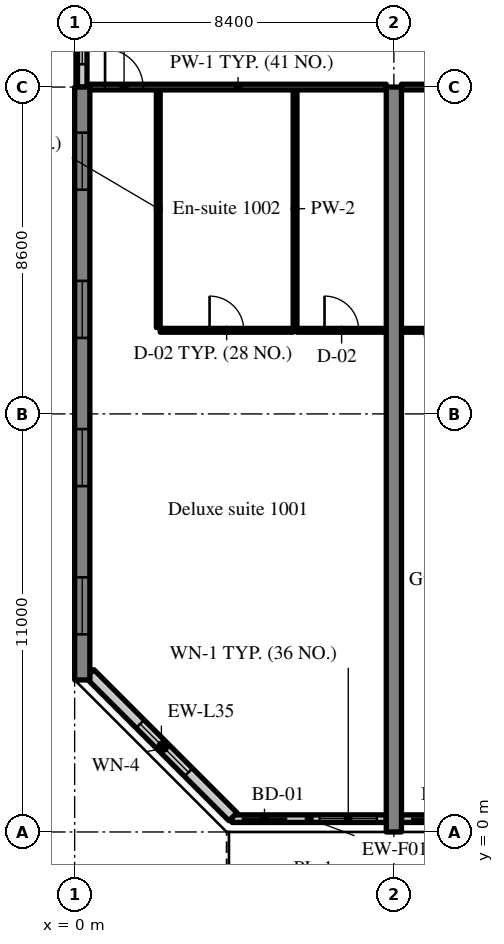
"""IFC4 building model, lengths in metres.
Left out: names, types, materials, properties, quantities, classifications, styles, units other than length and angle.
Written with IfcOpenShell. Run it as: python <this file> out.ifc"""

import sys

from ifc_helpers import new_model, si_unit, direction, frame, frame_2d, origin, place, context, subcontext, project, spatial, rectangle, extrude, source, transform, mapped, element, fill, save


model = new_model("IFC4")
c1 = context("Model", 3, precision=1e-05, world=origin(), true_north=direction((0.0, 1.0)))
c2 = subcontext(c1, "Body", "Model", "MODEL_VIEW")
j1 = project(units=[si_unit("LENGTHUNIT", "METRE"), si_unit("PLANEANGLEUNIT", "RADIAN")], contexts=[c1])
p1 = place(None, origin())
s1 = spatial("IfcSite", under=j1, at=p1, CompositionType="ELEMENT")
p2 = place(p1, origin())
s2 = spatial("IfcBuilding", under=s1, at=p2, CompositionType="ELEMENT")
p3 = place(p2, frame((0.0, 0.0, 46.8)))
s3 = spatial("IfcBuildingStorey", under=s2, at=p3, CompositionType="ELEMENT", Elevation=46.8)
m1 = source(origin(), c2, "Body", "SweptSolid", [
    extrude(rectangle(XDim=15.6, YDim=0.4, at=frame_2d((7.8, 0.0))), origin(), (0.0, 0.0, 1.0), 3.52),
])
p4 = place(p3, frame((0.2, 4.0, 0.0), z_axis=(0.0, 0.0, 1.0), x_axis=(0.0, 1.0, 0.0)))
e1 = element("IfcWall", 1, at=p4, inside=s3, PredefinedType="SHEAR", context=c2, shape_type="MappedRepresentation", body=[
    mapped(m1, transform((0.0, 0.0, 0.0), scale=1.0)),
])
m2 = source(origin(), c2, "Body", "SweptSolid", [
    extrude(rectangle(XDim=1.5, YDim=1.5, at=frame_2d((0.75, 0.75))), frame((0.0, 0.21, 0.0), z_axis=(0.0, -1.0, 0.0), x_axis=(1.0, 0.0, 0.0)), (0.0, 0.0, 1.0), 0.42),
])
p5 = place(p4, frame((1.2, 0.0, 0.9)))
e2 = element("IfcOpeningElement", 2, at=p5, cuts=e1, PredefinedType="OPENING", context=c2, shape_type="MappedRepresentation", body=[
    mapped(m2, transform((0.0, 0.0, 0.0), scale=1.0)),
])
p6 = place(p4, frame((5.1, 0.0, 0.9)))
e3 = element("IfcOpeningElement", 3, at=p6, cuts=e1, PredefinedType="OPENING", context=c2, shape_type="MappedRepresentation", body=[
    mapped(m2, transform((0.0, 0.0, 0.0), scale=1.0)),
])
p7 = place(p4, frame((9.0, 0.0, 0.9)))
e4 = element("IfcOpeningElement", 4, at=p7, cuts=e1, PredefinedType="OPENING", context=c2, shape_type="MappedRepresentation", body=[
    mapped(m2, transform((0.0, 0.0, 0.0), scale=1.0)),
])
p8 = place(p4, frame((12.9, 0.0, 0.9)))
e5 = element("IfcOpeningElement", 5, at=p8, cuts=e1, PredefinedType="OPENING", context=c2, shape_type="MappedRepresentation", body=[
    mapped(m2, transform((0.0, 0.0, 0.0), scale=1.0)),
])
m3 = source(origin(), c2, "Body", "SweptSolid", [
    extrude(rectangle(XDim=19.6, YDim=0.4, at=frame_2d((9.8, 0.0))), origin(), (0.0, 0.0, 1.0), 3.52),
])
p9 = place(p3, frame((8.4, 0.0, 0.0), z_axis=(0.0, 0.0, 1.0), x_axis=(0.0, 1.0, 0.0)))
e6 = element("IfcWall", 6, at=p9, inside=s3, PredefinedType="SHEAR", context=c2, shape_type="MappedRepresentation", body=[
    mapped(m3, transform((0.0, 0.0, 0.0), scale=1.0)),
])
m4 = source(origin(), c2, "Body", "SweptSolid", [
    extrude(rectangle(XDim=4.055, YDim=0.2, at=frame_2d((2.027, 0.0))), origin(), (0.0, 0.0, 1.0), 2.82),
])
p10 = place(p3, frame((4.145, 0.35, 0.0), z_axis=(0.0, 0.0, 1.0), x_axis=(1.0, 0.0, 0.0)))
e7 = element("IfcWall", 7, at=p10, inside=s3, PredefinedType="SOLIDWALL", context=c2, shape_type="MappedRepresentation", body=[
    mapped(m4, transform((0.0, 0.0, 0.0), scale=1.0)),
])
m5 = source(origin(), c2, "Body", "SweptSolid", [
    extrude(rectangle(XDim=1.2, YDim=2.4, at=frame_2d((0.6, 1.2))), frame((0.0, 0.11, 0.0), z_axis=(0.0, -1.0, 0.0), x_axis=(1.0, 0.0, 0.0)), (0.0, 0.0, 1.0), 0.22),
])
p11 = place(p10, frame((0.25, 0.0, 0.0)))
e8 = element("IfcOpeningElement", 8, at=p11, cuts=e7, PredefinedType="OPENING", context=c2, shape_type="MappedRepresentation", body=[
    mapped(m5, transform((0.0, 0.0, 0.0), scale=1.0)),
])
m6 = source(origin(), c2, "Body", "SweptSolid", [
    extrude(rectangle(XDim=1.5, YDim=1.5, at=frame_2d((0.75, 0.75))), frame((0.0, 0.11, 0.0), z_axis=(0.0, -1.0, 0.0), x_axis=(1.0, 0.0, 0.0)), (0.0, 0.0, 1.0), 0.22),
])
p12 = place(p10, frame((2.305, 0.0, 0.9)))
e9 = element("IfcOpeningElement", 9, at=p12, cuts=e7, PredefinedType="OPENING", context=c2, shape_type="MappedRepresentation", body=[
    mapped(m6, transform((0.0, 0.0, 0.0), scale=1.0)),
])
m7 = source(origin(), c2, "Body", "SweptSolid", [
    extrude(rectangle(XDim=3.6, YDim=0.2, at=frame_2d((1.8, 0.0))), origin(), (0.0, 0.0, 1.0), 2.82),
])
p13 = place(p3, frame((8.6, 0.35, 0.0), z_axis=(0.0, 0.0, 1.0), x_axis=(1.0, 0.0, 0.0)))
e10 = element("IfcWall", 10, at=p13, inside=s3, PredefinedType="SOLIDWALL", context=c2, shape_type="MappedRepresentation", body=[
    mapped(m7, transform((0.0, 0.0, 0.0), scale=1.0)),
])
p14 = place(p13, frame((0.25, 0.0, 0.0)))
e11 = element("IfcOpeningElement", 11, at=p14, cuts=e10, PredefinedType="OPENING", context=c2, shape_type="MappedRepresentation", body=[
    mapped(m5, transform((0.0, 0.0, 0.0), scale=1.0)),
])
p15 = place(p13, frame((1.85, 0.0, 0.9)))
e12 = element("IfcOpeningElement", 12, at=p15, cuts=e10, PredefinedType="OPENING", context=c2, shape_type="MappedRepresentation", body=[
    mapped(m6, transform((0.0, 0.0, 0.0), scale=1.0)),
])
m8 = source(origin(), c2, "Body", "SweptSolid", [
    extrude(rectangle(XDim=5.326, YDim=0.3, at=frame_2d((2.663, 0.0))), origin(), (0.0, 0.0, 1.0), 3.52),
])
p16 = place(p3, frame((0.4, 4.166, 0.0), z_axis=(0.0, 0.0, 1.0), x_axis=(0.707106781187, -0.707106781187, 0.0)))
e13 = element("IfcWall", 13, at=p16, inside=s3, PredefinedType="SOLIDWALL", context=c2, shape_type="MappedRepresentation", body=[
    mapped(m8, transform((0.0, 0.0, 0.0), scale=1.0)),
])
m9 = source(origin(), c2, "Body", "SweptSolid", [
    extrude(rectangle(XDim=1.8, YDim=1.5, at=frame_2d((0.9, 0.75))), frame((0.0, 0.16, 0.0), z_axis=(0.0, -1.0, 0.0), x_axis=(1.0, 0.0, 0.0)), (0.0, 0.0, 1.0), 0.32),
])
p17 = place(p16, frame((1.871, 0.0, 0.9)))
e14 = element("IfcOpeningElement", 14, at=p17, cuts=e13, PredefinedType="OPENING", context=c2, shape_type="MappedRepresentation", body=[
    mapped(m9, transform((0.0, 0.0, 0.0), scale=1.0)),
])
m10 = source(origin(), c2, "Body", "SweptSolid", [
    extrude(rectangle(XDim=2.4, YDim=0.25, at=frame_2d((1.2, 0.0))), origin(), (0.0, 0.0, 1.0), 2.62),
])
p18 = place(p3, frame((0.2, 19.6, 0.0), z_axis=(0.0, 0.0, 1.0), x_axis=(0.0, 1.0, 0.0)))
e15 = element("IfcWall", 15, at=p18, inside=s3, PredefinedType="SOLIDWALL", context=c2, shape_type="MappedRepresentation", body=[
    mapped(m10, transform((0.0, 0.0, 0.0), scale=1.0)),
])
m11 = source(origin(), c2, "Body", "SweptSolid", [
    extrude(rectangle(XDim=1.2, YDim=1.5, at=frame_2d((0.6, 0.75))), frame((0.0, 0.135, 0.0), z_axis=(0.0, -1.0, 0.0), x_axis=(1.0, 0.0, 0.0)), (0.0, 0.0, 1.0), 0.27),
])
p19 = place(p18, frame((0.6, 0.0, 0.9)))
e16 = element("IfcOpeningElement", 16, at=p19, cuts=e15, PredefinedType="OPENING", context=c2, shape_type="MappedRepresentation", body=[
    mapped(m11, transform((0.0, 0.0, 0.0), scale=1.0)),
])
m12 = source(origin(), c2, "Body", "SweptSolid", [
    extrude(rectangle(XDim=6.25, YDim=0.1, at=frame_2d((3.125, 0.0))), origin(), (0.0, 0.0, 1.0), 3.52),
])
for number, where, z_axis, x_axis in (
    (17, (2.2, 13.275, 0.0), (0.0, 0.0, 1.0), (0.0, 1.0, 0.0)),
    (18, (5.8, 13.275, 0.0), (0.0, 0.0, 1.0), (0.0, 1.0, 0.0)),
):
    element("IfcWall", number, at=place(p3, frame(where, z_axis=z_axis, x_axis=x_axis)), inside=s3, PredefinedType="PARTITIONING", context=c2, shape_type="MappedRepresentation", body=[
        mapped(m12, transform((0.0, 0.0, 0.0), scale=1.0)),
    ])
m13 = source(origin(), c2, "Body", "SweptSolid", [
    extrude(rectangle(XDim=3.5, YDim=0.1, at=frame_2d((1.75, 0.0))), origin(), (0.0, 0.0, 1.0), 3.52),
])
p20 = place(p3, frame((2.25, 13.2, 0.0), z_axis=(0.0, 0.0, 1.0), x_axis=(1.0, 0.0, 0.0)))
e19 = element("IfcWall", 19, at=p20, inside=s3, PredefinedType="PARTITIONING", context=c2, shape_type="MappedRepresentation", body=[
    mapped(m13, transform((0.0, 0.0, 0.0), scale=1.0)),
])
m14 = source(origin(), c2, "Body", "SweptSolid", [
    extrude(rectangle(XDim=0.9, YDim=2.1, at=frame_2d((0.45, 1.05))), frame((0.0, 0.06, 0.0), z_axis=(0.0, -1.0, 0.0), x_axis=(1.0, 0.0, 0.0)), (0.0, 0.0, 1.0), 0.12),
])
p21 = place(p20, frame((1.3, 0.0, 0.0)))
e20 = element("IfcOpeningElement", 20, at=p21, cuts=e19, PredefinedType="OPENING", context=c2, shape_type="MappedRepresentation", body=[
    mapped(m14, transform((0.0, 0.0, 0.0), scale=1.0)),
])
m15 = source(origin(), c2, "Body", "SweptSolid", [
    extrude(rectangle(XDim=2.35, YDim=0.1, at=frame_2d((1.175, 0.0))), origin(), (0.0, 0.0, 1.0), 3.52),
])
p22 = place(p3, frame((5.85, 13.2, 0.0), z_axis=(0.0, 0.0, 1.0), x_axis=(1.0, 0.0, 0.0)))
e21 = element("IfcWall", 21, at=p22, inside=s3, PredefinedType="PARTITIONING", context=c2, shape_type="MappedRepresentation", body=[
    mapped(m15, transform((0.0, 0.0, 0.0), scale=1.0)),
])
p23 = place(p22, frame((0.725, 0.0, 0.0)))
e22 = element("IfcOpeningElement", 22, at=p23, cuts=e21, PredefinedType="OPENING", context=c2, shape_type="MappedRepresentation", body=[
    mapped(m14, transform((0.0, 0.0, 0.0), scale=1.0)),
])
m16 = source(origin(), c2, "Body", "SweptSolid", [
    extrude(rectangle(XDim=7.8, YDim=0.15, at=frame_2d((3.9, 0.0))), origin(), (0.0, 0.0, 1.0), 2.82),
])
p24 = place(p3, frame((0.4, 19.6, 0.0), z_axis=(0.0, 0.0, 1.0), x_axis=(1.0, 0.0, 0.0)))
e23 = element("IfcWall", 23, at=p24, inside=s3, PredefinedType="PARTITIONING", context=c2, shape_type="MappedRepresentation", body=[
    mapped(m16, transform((0.0, 0.0, 0.0), scale=1.0)),
])
m17 = source(origin(), c2, "Body", "SweptSolid", [
    extrude(rectangle(XDim=1.0, YDim=2.1, at=frame_2d((0.5, 1.05))), frame((0.0, 0.085, 0.0), z_axis=(0.0, -1.0, 0.0), x_axis=(1.0, 0.0, 0.0)), (0.0, 0.0, 1.0), 0.17),
])
p25 = place(p24, frame((0.4, 0.0, 0.0)))
e24 = element("IfcOpeningElement", 24, at=p25, cuts=e23, PredefinedType="OPENING", context=c2, shape_type="MappedRepresentation", body=[
    mapped(m17, transform((0.0, 0.0, 0.0), scale=1.0)),
])
m18 = source(origin(), c2, "Body", "SweptSolid", [
    extrude(rectangle(XDim=2.075, YDim=0.1, at=frame_2d((1.038, 0.0))), origin(), (0.0, 0.0, 1.0), 3.52),
])
p26 = place(p3, frame((8.6, 13.2, 0.0), z_axis=(0.0, 0.0, 1.0), x_axis=(1.0, 0.0, 0.0)))
e25 = element("IfcWall", 25, at=p26, inside=s3, PredefinedType="PARTITIONING", context=c2, shape_type="MappedRepresentation", body=[
    mapped(m18, transform((0.0, 0.0, 0.0), scale=1.0)),
])
p27 = place(p26, frame((0.588, 0.0, 0.0)))
e26 = element("IfcOpeningElement", 26, at=p27, cuts=e25, PredefinedType="OPENING", context=c2, shape_type="MappedRepresentation", body=[
    mapped(m14, transform((0.0, 0.0, 0.0), scale=1.0)),
])
m19 = source(origin(), c2, "Body", "SweptSolid", [
    extrude(rectangle(XDim=3.925, YDim=0.15, at=frame_2d((1.962, 0.0))), origin(), (0.0, 0.0, 1.0), 2.82),
])
p28 = place(p3, frame((8.6, 19.6, 0.0), z_axis=(0.0, 0.0, 1.0), x_axis=(1.0, 0.0, 0.0)))
e27 = element("IfcWall", 27, at=p28, inside=s3, PredefinedType="PARTITIONING", context=c2, shape_type="MappedRepresentation", body=[
    mapped(m19, transform((0.0, 0.0, 0.0), scale=1.0)),
])
p29 = place(p28, frame((2.525, 0.0, 0.0)))
e28 = element("IfcOpeningElement", 28, at=p29, cuts=e27, PredefinedType="OPENING", context=c2, shape_type="MappedRepresentation", body=[
    mapped(m17, transform((0.0, 0.0, 0.0), scale=1.0)),
])
m20 = source(origin(), c2, "Body", "SweptSolid", [
    extrude(rectangle(XDim=1.2, YDim=2.4, at=frame_2d((0.6, 1.2))), frame((0.0, 0.025, 0.0), z_axis=(0.0, -1.0, 0.0), x_axis=(1.0, 0.0, 0.0)), (0.0, 0.0, 1.0), 0.05),
])
p30 = place(p11, origin())
e29 = element("IfcDoor", 29, at=p30, inside=s3, OperationType="SLIDING_TO_LEFT", PredefinedType="DOOR", context=c2, shape_type="MappedRepresentation", body=[
    mapped(m20, transform((0.0, 0.0, 0.0), scale=1.0)),
])
fill(e8, e29)
m21 = source(origin(), c2, "Body", "SweptSolid", [
    extrude(rectangle(XDim=1.5, YDim=1.5, at=frame_2d((0.75, 0.75))), frame((0.0, 0.03, 0.0), z_axis=(0.0, -1.0, 0.0), x_axis=(1.0, 0.0, 0.0)), (0.0, 0.0, 1.0), 0.06),
])
p31 = place(p12, origin())
e30 = element("IfcWindow", 30, at=p31, inside=s3, PartitioningType="SINGLE_PANEL", PredefinedType="WINDOW", context=c2, shape_type="MappedRepresentation", body=[
    mapped(m21, transform((0.0, 0.0, 0.0), scale=1.0)),
])
fill(e9, e30)
p32 = place(p14, origin())
e31 = element("IfcDoor", 31, at=p32, inside=s3, OperationType="SLIDING_TO_RIGHT", PredefinedType="DOOR", context=c2, shape_type="MappedRepresentation", body=[
    mapped(m20, transform((0.0, 0.0, 0.0), scale=1.0)),
])
fill(e11, e31)
m22 = source(origin(), c2, "Body", "SweptSolid", [
    extrude(rectangle(XDim=1.8, YDim=1.5, at=frame_2d((0.9, 0.75))), frame((0.0, 0.03, 0.0), z_axis=(0.0, -1.0, 0.0), x_axis=(1.0, 0.0, 0.0)), (0.0, 0.0, 1.0), 0.06),
])
p33 = place(p17, origin())
e32 = element("IfcWindow", 32, at=p33, inside=s3, PartitioningType="SINGLE_PANEL", PredefinedType="WINDOW", context=c2, shape_type="MappedRepresentation", body=[
    mapped(m22, transform((0.0, 0.0, 0.0), scale=1.0)),
])
fill(e14, e32)
p34 = place(p5, origin())
e33 = element("IfcWindow", 33, at=p34, inside=s3, PartitioningType="SINGLE_PANEL", PredefinedType="WINDOW", context=c2, shape_type="MappedRepresentation", body=[
    mapped(m21, transform((0.0, 0.0, 0.0), scale=1.0)),
])
fill(e2, e33)
p35 = place(p6, origin())
e34 = element("IfcWindow", 34, at=p35, inside=s3, PartitioningType="SINGLE_PANEL", PredefinedType="WINDOW", context=c2, shape_type="MappedRepresentation", body=[
    mapped(m21, transform((0.0, 0.0, 0.0), scale=1.0)),
])
fill(e3, e34)
p36 = place(p7, origin())
e35 = element("IfcWindow", 35, at=p36, inside=s3, PartitioningType="SINGLE_PANEL", PredefinedType="WINDOW", context=c2, shape_type="MappedRepresentation", body=[
    mapped(m21, transform((0.0, 0.0, 0.0), scale=1.0)),
])
fill(e4, e35)
p37 = place(p8, origin())
e36 = element("IfcWindow", 36, at=p37, inside=s3, PartitioningType="SINGLE_PANEL", PredefinedType="WINDOW", context=c2, shape_type="MappedRepresentation", body=[
    mapped(m21, transform((0.0, 0.0, 0.0), scale=1.0)),
])
fill(e5, e36)
m23 = source(origin(), c2, "Body", "SweptSolid", [
    extrude(rectangle(XDim=1.2, YDim=1.5, at=frame_2d((0.6, 0.75))), frame((0.0, 0.03, 0.0), z_axis=(0.0, -1.0, 0.0), x_axis=(1.0, 0.0, 0.0)), (0.0, 0.0, 1.0), 0.06),
])
p38 = place(p19, origin())
e37 = element("IfcWindow", 37, at=p38, inside=s3, PartitioningType="SINGLE_PANEL", PredefinedType="WINDOW", context=c2, shape_type="MappedRepresentation", body=[
    mapped(m23, transform((0.0, 0.0, 0.0), scale=1.0)),
])
fill(e16, e37)
m24 = source(origin(), c2, "Body", "SweptSolid", [
    extrude(rectangle(XDim=0.9, YDim=2.1, at=frame_2d((0.45, 1.05))), frame((0.0, 0.025, 0.0), z_axis=(0.0, -1.0, 0.0), x_axis=(1.0, 0.0, 0.0)), (0.0, 0.0, 1.0), 0.05),
])
p39 = place(p21, origin())
e38 = element("IfcDoor", 38, at=p39, inside=s3, OperationType="SINGLE_SWING_LEFT", PredefinedType="DOOR", context=c2, shape_type="MappedRepresentation", body=[
    mapped(m24, transform((0.0, 0.0, 0.0), scale=1.0)),
])
fill(e20, e38)
p40 = place(p23, origin())
e39 = element("IfcDoor", 39, at=p40, inside=s3, OperationType="SINGLE_SWING_LEFT", PredefinedType="DOOR", context=c2, shape_type="MappedRepresentation", body=[
    mapped(m24, transform((0.0, 0.0, 0.0), scale=1.0)),
])
fill(e22, e39)
m25 = source(origin(), c2, "Body", "SweptSolid", [
    extrude(rectangle(XDim=1.0, YDim=2.1, at=frame_2d((0.5, 1.05))), frame((0.0, 0.025, 0.0), z_axis=(0.0, -1.0, 0.0), x_axis=(1.0, 0.0, 0.0)), (0.0, 0.0, 1.0), 0.05),
])
p41 = place(p25, origin())
e40 = element("IfcDoor", 40, at=p41, inside=s3, OperationType="SINGLE_SWING_LEFT", PredefinedType="DOOR", context=c2, shape_type="MappedRepresentation", body=[
    mapped(m25, transform((0.0, 0.0, 0.0), scale=1.0)),
])
fill(e24, e40)
p42 = place(p27, origin())
e41 = element("IfcDoor", 41, at=p42, inside=s3, OperationType="SINGLE_SWING_RIGHT", PredefinedType="DOOR", context=c2, shape_type="MappedRepresentation", body=[
    mapped(m24, transform((0.0, 0.0, 0.0), scale=1.0)),
])
fill(e26, e41)
save(model, sys.argv[1])
